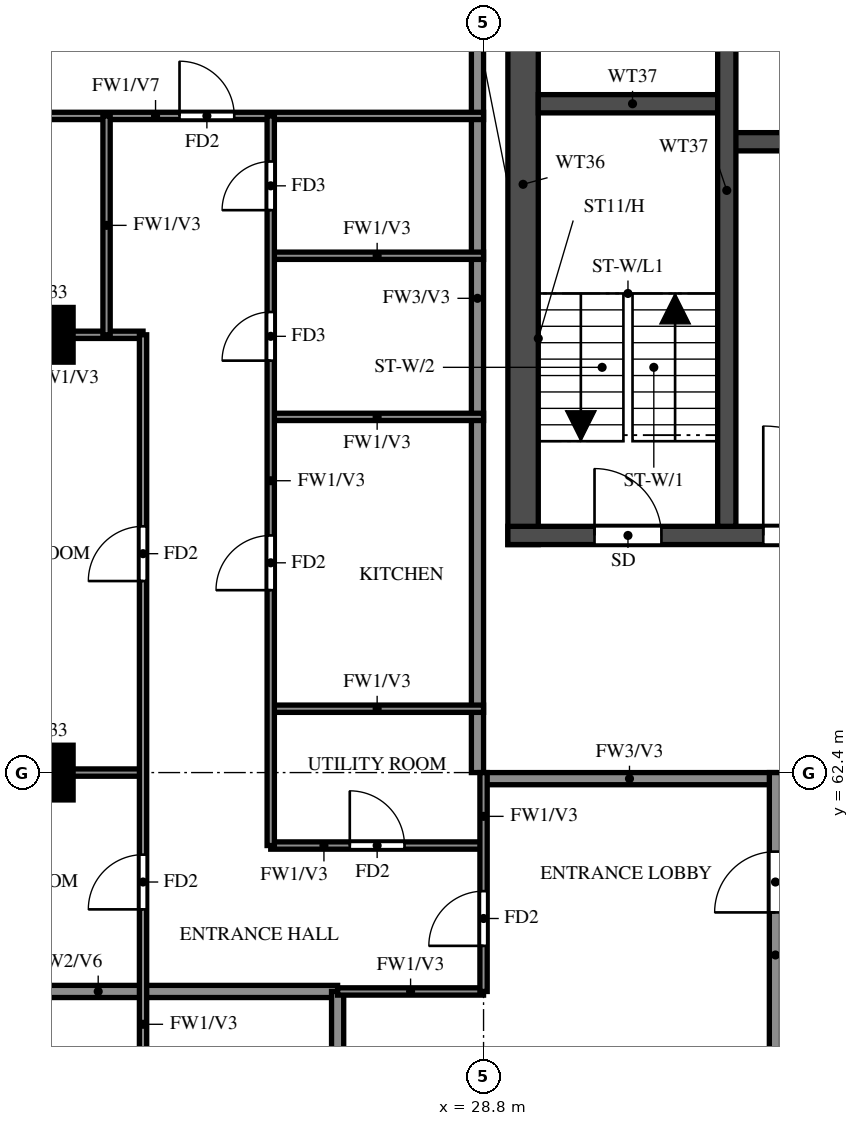
"""IFC4 building model, lengths in metres.
Left out: names, types, materials, properties, quantities, classifications, styles, units other than length and angle.
Written with IfcOpenShell. Run it as: python <this file> out.ifc"""

import sys

from ifc_helpers import new_model, si_unit, direction, frame, frame_2d, origin, origin_2d, place, context, subcontext, project, spatial, rectangle, extrude, source, transform, mapped, element, fill, save


model = new_model("IFC4")
c1 = context("Model", 3, precision=1e-05, world=origin(), true_north=direction((0.0, 1.0)))
c2 = subcontext(c1, "Body", "Model", "MODEL_VIEW")
j1 = project(units=[si_unit("LENGTHUNIT", "METRE"), si_unit("PLANEANGLEUNIT", "RADIAN")], contexts=[c1])
p1 = place(None, origin())
s1 = spatial("IfcSite", under=j1, at=p1, CompositionType="ELEMENT")
p2 = place(p1, origin())
s2 = spatial("IfcBuilding", under=s1, at=p2, CompositionType="ELEMENT")
p3 = place(p2, frame((0.0, 0.0, 218.5)))
s3 = spatial("IfcBuildingStorey", under=s2, at=p3, CompositionType="ELEMENT", Elevation=218.5)
m1 = source(origin(), c2, "Body", "SweptSolid", [
    extrude(rectangle(XDim=0.9, YDim=0.9, at=origin_2d()), origin(), (0.0, 0.0, 1.0), 3.22),
])
for number, where, z_axis, x_axis in (
    (1, (21.6, 62.4, 0.0), (0.0, 0.0, 1.0), (1.0, 0.0, 0.0)),
    (2, (21.6, 69.6, 0.0), (0.0, 0.0, 1.0), (1.0, 0.0, 0.0)),
):
    element("IfcColumn", number, at=place(p3, frame(where, z_axis=z_axis, x_axis=x_axis)), inside=s3, PredefinedType="COLUMN", context=c2, shape_type="MappedRepresentation", body=[
        mapped(m1, transform((0.0, 0.0, 0.0))),
    ])
p4 = place(p3, frame((29.45, 66.15, 0.0), z_axis=(0.0, 0.0, 1.0), x_axis=(0.0, 1.0, 0.0)))
e3 = element("IfcWall", 3, at=p4, inside=s3, PredefinedType="SHEAR", context=c2, shape_type="SweptSolid", body=[
    extrude(rectangle(XDim=11.85, YDim=0.5, at=frame_2d((5.925, 0.0))), origin(), (0.0, 0.0, 1.0), 3.22),
])
p5 = place(p3, frame((29.2, 66.3, 0.0), z_axis=(0.0, 0.0, 1.0), x_axis=(1.0, 0.0, 0.0)))
e4 = element("IfcWall", 4, at=p5, inside=s3, PredefinedType="SHEAR", context=c2, shape_type="SweptSolid", body=[
    extrude(rectangle(XDim=42.4, YDim=0.3, at=frame_2d((21.2, 0.0))), origin(), (0.0, 0.0, 1.0), 3.22),
])
p6 = place(p5, frame((1.425, 0.0, 0.0)))
e5 = element("IfcOpeningElement", 5, at=p6, cuts=e4, PredefinedType="OPENING", context=c2, shape_type="SweptSolid", body=[
    extrude(rectangle(XDim=1.1, YDim=2.1, at=frame_2d((0.55, 1.05))), frame((0.0, 0.16, 0.0), z_axis=(0.0, -1.0, 0.0), x_axis=(1.0, 0.0, 0.0)), (0.0, 0.0, 1.0), 0.32),
])
p7 = place(p5, frame((4.2, 0.0, 0.0)))
e6 = element("IfcOpeningElement", 6, at=p7, cuts=e4, PredefinedType="OPENING", context=c2, shape_type="SweptSolid", body=[
    extrude(rectangle(XDim=1.8, YDim=2.1, at=frame_2d((0.9, 1.05))), frame((0.0, 0.16, 0.0), z_axis=(0.0, -1.0, 0.0), x_axis=(1.0, 0.0, 0.0)), (0.0, 0.0, 1.0), 0.32),
])
p8 = place(p3, frame((32.8, 72.775, 0.0), z_axis=(0.0, 0.0, 1.0), x_axis=(1.0, 0.0, 0.0)))
e7 = element("IfcWall", 7, at=p8, inside=s3, PredefinedType="SHEAR", context=c2, shape_type="SweptSolid", body=[
    extrude(rectangle(XDim=35.2, YDim=0.3, at=frame_2d((17.6, 0.0))), origin(), (0.0, 0.0, 1.0), 3.22),
])
p9 = place(p8, frame((19.8, 0.0, 0.0)))
e8 = element("IfcOpeningElement", 8, at=p9, cuts=e7, PredefinedType="OPENING", context=c2, shape_type="SweptSolid", body=[
    extrude(rectangle(XDim=1.1, YDim=2.1, at=frame_2d((0.55, 1.05))), frame((0.0, 0.16, 0.0), z_axis=(0.0, -1.0, 0.0), x_axis=(1.0, 0.0, 0.0)), (0.0, 0.0, 1.0), 0.32),
])
p10 = place(p8, frame((27.725, 0.0, 0.0)))
e9 = element("IfcOpeningElement", 9, at=p10, cuts=e7, PredefinedType="OPENING", context=c2, shape_type="SweptSolid", body=[
    extrude(rectangle(XDim=1.1, YDim=2.1, at=frame_2d((0.55, 1.05))), frame((0.0, 0.16, 0.0), z_axis=(0.0, -1.0, 0.0), x_axis=(1.0, 0.0, 0.0)), (0.0, 0.0, 1.0), 0.32),
])
p11 = place(p8, frame((30.325, 0.0, 0.0)))
e10 = element("IfcOpeningElement", 10, at=p11, cuts=e7, PredefinedType="OPENING", context=c2, shape_type="SweptSolid", body=[
    extrude(rectangle(XDim=1.1, YDim=2.1, at=frame_2d((0.55, 1.05))), frame((0.0, 0.16, 0.0), z_axis=(0.0, -1.0, 0.0), x_axis=(1.0, 0.0, 0.0)), (0.0, 0.0, 1.0), 0.32),
])
p12 = place(p8, frame((3.825, 0.0, 0.0)))
e11 = element("IfcOpeningElement", 11, at=p12, cuts=e7, PredefinedType="OPENING", context=c2, shape_type="SweptSolid", body=[
    extrude(rectangle(XDim=1.1, YDim=2.1, at=frame_2d((0.55, 1.05))), frame((0.0, 0.16, 0.0), z_axis=(0.0, -1.0, 0.0), x_axis=(1.0, 0.0, 0.0)), (0.0, 0.0, 1.0), 0.32),
])
p13 = place(p8, frame((6.575, 0.0, 0.0)))
e12 = element("IfcOpeningElement", 12, at=p13, cuts=e7, PredefinedType="OPENING", context=c2, shape_type="SweptSolid", body=[
    extrude(rectangle(XDim=1.1, YDim=2.1, at=frame_2d((0.55, 1.05))), frame((0.0, 0.16, 0.0), z_axis=(0.0, -1.0, 0.0), x_axis=(1.0, 0.0, 0.0)), (0.0, 0.0, 1.0), 0.32),
])
p14 = place(p8, frame((9.325, 0.0, 0.0)))
e13 = element("IfcOpeningElement", 13, at=p14, cuts=e7, PredefinedType="OPENING", context=c2, shape_type="SweptSolid", body=[
    extrude(rectangle(XDim=1.1, YDim=2.1, at=frame_2d((0.55, 1.05))), frame((0.0, 0.16, 0.0), z_axis=(0.0, -1.0, 0.0), x_axis=(1.0, 0.0, 0.0)), (0.0, 0.0, 1.0), 0.32),
])
p15 = place(p8, frame((12.075, 0.0, 0.0)))
e14 = element("IfcOpeningElement", 14, at=p15, cuts=e7, PredefinedType="OPENING", context=c2, shape_type="SweptSolid", body=[
    extrude(rectangle(XDim=1.1, YDim=2.1, at=frame_2d((0.55, 1.05))), frame((0.0, 0.16, 0.0), z_axis=(0.0, -1.0, 0.0), x_axis=(1.0, 0.0, 0.0)), (0.0, 0.0, 1.0), 0.32),
])
p16 = place(p8, frame((14.825, 0.0, 0.0)))
e15 = element("IfcOpeningElement", 15, at=p16, cuts=e7, PredefinedType="OPENING", context=c2, shape_type="SweptSolid", body=[
    extrude(rectangle(XDim=1.1, YDim=2.1, at=frame_2d((0.55, 1.05))), frame((0.0, 0.16, 0.0), z_axis=(0.0, -1.0, 0.0), x_axis=(1.0, 0.0, 0.0)), (0.0, 0.0, 1.0), 0.32),
])
p17 = place(p8, frame((17.575, 0.0, 0.0)))
e16 = element("IfcOpeningElement", 16, at=p17, cuts=e7, PredefinedType="OPENING", context=c2, shape_type="SweptSolid", body=[
    extrude(rectangle(XDim=1.1, YDim=2.1, at=frame_2d((0.55, 1.05))), frame((0.0, 0.16, 0.0), z_axis=(0.0, -1.0, 0.0), x_axis=(1.0, 0.0, 0.0)), (0.0, 0.0, 1.0), 0.32),
])
p18 = place(p8, frame((0.95, 0.0, 0.0)))
e17 = element("IfcOpeningElement", 17, at=p18, cuts=e7, PredefinedType="OPENING", context=c2, shape_type="SweptSolid", body=[
    extrude(rectangle(XDim=1.1, YDim=2.1, at=frame_2d((0.55, 1.05))), frame((0.0, 0.16, 0.0), z_axis=(0.0, -1.0, 0.0), x_axis=(1.0, 0.0, 0.0)), (0.0, 0.0, 1.0), 0.32),
])
p19 = place(p3, frame((29.7, 73.4, 0.0), z_axis=(0.0, 0.0, 1.0), x_axis=(1.0, 0.0, 0.0)))
e18 = element("IfcWall", 18, at=p19, inside=s3, PredefinedType="SHEAR", context=c2, shape_type="SweptSolid", body=[
    extrude(rectangle(XDim=3.1, YDim=0.3, at=frame_2d((1.55, 0.0))), origin(), (0.0, 0.0, 1.0), 3.22),
])
p20 = place(p3, frame((32.8, 66.45, 0.0), z_axis=(0.0, 0.0, 1.0), x_axis=(0.0, 1.0, 0.0)))
e19 = element("IfcWall", 19, at=p20, inside=s3, PredefinedType="SHEAR", context=c2, shape_type="SweptSolid", body=[
    extrude(rectangle(XDim=11.05, YDim=0.3, at=frame_2d((5.525, 0.0))), origin(), (0.0, 0.0, 1.0), 3.22),
])
p21 = place(p3, frame((28.8, 62.3, 0.0), z_axis=(0.0, 0.0, 1.0), x_axis=(1.0, 0.0, 0.0)))
e20 = element("IfcWall", 20, at=p21, inside=s3, PredefinedType="SOLIDWALL", context=c2, shape_type="SweptSolid", body=[
    extrude(rectangle(XDim=4.8, YDim=0.2, at=frame_2d((2.4, 0.0))), origin(), (0.0, 0.0, 1.0), 3.22),
])
p22 = place(p3, frame((28.7, 62.4, 0.0), z_axis=(0.0, 0.0, 1.0), x_axis=(0.0, 1.0, 0.0)))
e21 = element("IfcWall", 21, at=p22, inside=s3, PredefinedType="SOLIDWALL", context=c2, shape_type="SweptSolid", body=[
    extrude(rectangle(XDim=15.6, YDim=0.2, at=frame_2d((7.8, 0.0))), origin(), (0.0, 0.0, 1.0), 3.22),
])
p23 = place(p3, frame((33.6, 56.4, 0.0), z_axis=(0.0, 0.0, 1.0), x_axis=(0.0, 1.0, 0.0)))
e22 = element("IfcWall", 22, at=p23, inside=s3, PredefinedType="SOLIDWALL", context=c2, shape_type="SweptSolid", body=[
    extrude(rectangle(XDim=6.0, YDim=0.2, at=frame_2d((3.0, 0.0))), origin(), (0.0, 0.0, 1.0), 3.22),
])
p24 = place(p23, frame((3.7, 0.0, 0.0)))
e23 = element("IfcOpeningElement", 23, at=p24, cuts=e22, PredefinedType="OPENING", context=c2, shape_type="SweptSolid", body=[
    extrude(rectangle(XDim=1.0, YDim=2.1, at=frame_2d((0.5, 1.05))), frame((0.0, 0.11, 0.0), z_axis=(0.0, -1.0, 0.0), x_axis=(1.0, 0.0, 0.0)), (0.0, 0.0, 1.0), 0.22),
])
p25 = place(p3, frame((18.525, 58.8, 0.0), z_axis=(0.0, 0.0, 1.0), x_axis=(1.0, 0.0, 0.0)))
e24 = element("IfcWall", 24, at=p25, inside=s3, PredefinedType="SOLIDWALL", context=c2, shape_type="SweptSolid", body=[
    extrude(rectangle(XDim=7.875, YDim=0.2, at=frame_2d((3.938, 0.0))), origin(), (0.0, 0.0, 1.0), 2.32),
])
p26 = place(p3, frame((26.4, 56.4, 0.0), z_axis=(0.0, 0.0, 1.0), x_axis=(0.0, 1.0, 0.0)))
e25 = element("IfcWall", 25, at=p26, inside=s3, PredefinedType="SOLIDWALL", context=c2, shape_type="SweptSolid", body=[
    extrude(rectangle(XDim=2.4, YDim=0.2, at=frame_2d((1.2, 0.0))), origin(), (0.0, 0.0, 1.0), 3.22),
])
p27 = place(p3, frame((26.4, 58.8, 0.0), z_axis=(0.0, 0.0, 1.0), x_axis=(1.0, 0.0, 0.0)))
e26 = element("IfcWall", 26, at=p27, inside=s3, PredefinedType="PARTITIONING", context=c2, shape_type="SweptSolid", body=[
    extrude(rectangle(XDim=2.4, YDim=0.12, at=frame_2d((1.2, 0.0))), origin(), (0.0, 0.0, 1.0), 3.22),
])
p28 = place(p3, frame((25.3, 61.2, 0.0), z_axis=(0.0, 0.0, 1.0), x_axis=(1.0, 0.0, 0.0)))
e27 = element("IfcWall", 27, at=p28, inside=s3, PredefinedType="PARTITIONING", context=c2, shape_type="SweptSolid", body=[
    extrude(rectangle(XDim=3.5, YDim=0.12, at=frame_2d((1.75, 0.0))), origin(), (0.0, 0.0, 1.0), 3.22),
])
p29 = place(p28, frame((1.3, 0.0, 0.0)))
e28 = element("IfcOpeningElement", 28, at=p29, cuts=e27, PredefinedType="OPENING", context=c2, shape_type="SweptSolid", body=[
    extrude(rectangle(XDim=0.9, YDim=2.1, at=frame_2d((0.45, 1.05))), frame((0.0, 0.07, 0.0), z_axis=(0.0, -1.0, 0.0), x_axis=(1.0, 0.0, 0.0)), (0.0, 0.0, 1.0), 0.14),
])
p30 = place(p3, frame((18.525, 62.4, 0.0), z_axis=(0.0, 0.0, 1.0), x_axis=(1.0, 0.0, 0.0)))
e29 = element("IfcWall", 29, at=p30, inside=s3, PredefinedType="PARTITIONING", context=c2, shape_type="SweptSolid", body=[
    extrude(rectangle(XDim=4.675, YDim=0.12, at=frame_2d((2.337, 0.0))), origin(), (0.0, 0.0, 1.0), 3.22),
])
for number, where, z_axis, x_axis in (
    (30, (25.3, 63.45, 0.0), (0.0, 0.0, 1.0), (1.0, 0.0, 0.0)),
    (31, (25.3, 68.25, 0.0), (0.0, 0.0, 1.0), (1.0, 0.0, 0.0)),
):
    element("IfcWall", number, at=place(p3, frame(where, z_axis=z_axis, x_axis=x_axis)), inside=s3, PredefinedType="PARTITIONING", context=c2, shape_type="SweptSolid", body=[
        extrude(rectangle(XDim=3.5, YDim=0.12, at=frame_2d((1.75, 0.0))), origin(), (0.0, 0.0, 1.0), 3.22),
    ])
p31 = place(p3, frame((18.525, 69.6, 0.0), z_axis=(0.0, 0.0, 1.0), x_axis=(1.0, 0.0, 0.0)))
e32 = element("IfcWall", 32, at=p31, inside=s3, PredefinedType="PARTITIONING", context=c2, shape_type="SweptSolid", body=[
    extrude(rectangle(XDim=4.675, YDim=0.12, at=frame_2d((2.337, 0.0))), origin(), (0.0, 0.0, 1.0), 3.22),
])
p32 = place(p31, frame((1.538, 0.0, 0.0)))
e33 = element("IfcOpeningElement", 33, at=p32, cuts=e32, PredefinedType="OPENING", context=c2, shape_type="SweptSolid", body=[
    extrude(rectangle(XDim=0.8, YDim=2.1, at=frame_2d((0.4, 1.05))), frame((0.0, 0.07, 0.0), z_axis=(0.0, -1.0, 0.0), x_axis=(1.0, 0.0, 0.0)), (0.0, 0.0, 1.0), 0.14),
])
p33 = place(p3, frame((25.3, 70.9, 0.0), z_axis=(0.0, 0.0, 1.0), x_axis=(1.0, 0.0, 0.0)))
e34 = element("IfcWall", 34, at=p33, inside=s3, PredefinedType="PARTITIONING", context=c2, shape_type="SweptSolid", body=[
    extrude(rectangle(XDim=3.5, YDim=0.12, at=frame_2d((1.75, 0.0))), origin(), (0.0, 0.0, 1.0), 3.22),
])
p34 = place(p3, frame((18.525, 73.2, 0.0), z_axis=(0.0, 0.0, 1.0), x_axis=(1.0, 0.0, 0.0)))
e35 = element("IfcWall", 35, at=p34, inside=s3, PredefinedType="PARTITIONING", context=c2, shape_type="SweptSolid", body=[
    extrude(rectangle(XDim=10.275, YDim=0.12, at=frame_2d((5.138, 0.0))), origin(), (0.0, 0.0, 1.0), 2.32),
])
p35 = place(p34, frame((5.275, 0.0, 0.0)))
e36 = element("IfcOpeningElement", 36, at=p35, cuts=e35, PredefinedType="OPENING", context=c2, shape_type="SweptSolid", body=[
    extrude(rectangle(XDim=0.9, YDim=2.1, at=frame_2d((0.45, 1.05))), frame((0.0, 0.07, 0.0), z_axis=(0.0, -1.0, 0.0), x_axis=(1.0, 0.0, 0.0)), (0.0, 0.0, 1.0), 0.14),
])
p36 = place(p3, frame((22.6, 69.6, 0.0), z_axis=(0.0, 0.0, 1.0), x_axis=(0.0, 1.0, 0.0)))
e37 = element("IfcWall", 37, at=p36, inside=s3, PredefinedType="PARTITIONING", context=c2, shape_type="SweptSolid", body=[
    extrude(rectangle(XDim=3.6, YDim=0.12, at=frame_2d((1.8, 0.0))), origin(), (0.0, 0.0, 1.0), 3.22),
])
p37 = place(p3, frame((23.2, 48.0, 0.0), z_axis=(0.0, 0.0, 1.0), x_axis=(0.0, 1.0, 0.0)))
e38 = element("IfcWall", 38, at=p37, inside=s3, PredefinedType="PARTITIONING", context=c2, shape_type="SweptSolid", body=[
    extrude(rectangle(XDim=21.6, YDim=0.12, at=frame_2d((10.8, 0.0))), origin(), (0.0, 0.0, 1.0), 3.22),
])
p38 = place(p37, frame((1.35, 0.0, 0.0)))
e39 = element("IfcOpeningElement", 39, at=p38, cuts=e38, PredefinedType="OPENING", context=c2, shape_type="SweptSolid", body=[
    extrude(rectangle(XDim=0.9, YDim=2.1, at=frame_2d((0.45, 1.05))), frame((0.0, 0.07, 0.0), z_axis=(0.0, -1.0, 0.0), x_axis=(1.0, 0.0, 0.0)), (0.0, 0.0, 1.0), 0.14),
])
p39 = place(p37, frame((4.95, 0.0, 0.0)))
e40 = element("IfcOpeningElement", 40, at=p39, cuts=e38, PredefinedType="OPENING", context=c2, shape_type="SweptSolid", body=[
    extrude(rectangle(XDim=0.9, YDim=2.1, at=frame_2d((0.45, 1.05))), frame((0.0, 0.07, 0.0), z_axis=(0.0, -1.0, 0.0), x_axis=(1.0, 0.0, 0.0)), (0.0, 0.0, 1.0), 0.14),
])
p40 = place(p37, frame((8.25, 0.0, 0.0)))
e41 = element("IfcOpeningElement", 41, at=p40, cuts=e38, PredefinedType="OPENING", context=c2, shape_type="SweptSolid", body=[
    extrude(rectangle(XDim=1.5, YDim=2.1, at=frame_2d((0.75, 1.05))), frame((0.0, 0.07, 0.0), z_axis=(0.0, -1.0, 0.0), x_axis=(1.0, 0.0, 0.0)), (0.0, 0.0, 1.0), 0.14),
])
p41 = place(p37, frame((12.15, 0.0, 0.0)))
e42 = element("IfcOpeningElement", 42, at=p41, cuts=e38, PredefinedType="OPENING", context=c2, shape_type="SweptSolid", body=[
    extrude(rectangle(XDim=0.9, YDim=2.1, at=frame_2d((0.45, 1.05))), frame((0.0, 0.07, 0.0), z_axis=(0.0, -1.0, 0.0), x_axis=(1.0, 0.0, 0.0)), (0.0, 0.0, 1.0), 0.14),
])
p42 = place(p37, frame((17.55, 0.0, 0.0)))
e43 = element("IfcOpeningElement", 43, at=p42, cuts=e38, PredefinedType="OPENING", context=c2, shape_type="SweptSolid", body=[
    extrude(rectangle(XDim=0.9, YDim=2.1, at=frame_2d((0.45, 1.05))), frame((0.0, 0.07, 0.0), z_axis=(0.0, -1.0, 0.0), x_axis=(1.0, 0.0, 0.0)), (0.0, 0.0, 1.0), 0.14),
])
p43 = place(p3, frame((25.3, 61.2, 0.0), z_axis=(0.0, 0.0, 1.0), x_axis=(0.0, 1.0, 0.0)))
e44 = element("IfcWall", 44, at=p43, inside=s3, PredefinedType="PARTITIONING", context=c2, shape_type="SweptSolid", body=[
    extrude(rectangle(XDim=12.0, YDim=0.12, at=frame_2d((6.0, 0.0))), origin(), (0.0, 0.0, 1.0), 3.22),
])
p44 = place(p43, frame((4.2, 0.0, 0.0)))
e45 = element("IfcOpeningElement", 45, at=p44, cuts=e44, PredefinedType="OPENING", context=c2, shape_type="SweptSolid", body=[
    extrude(rectangle(XDim=0.9, YDim=2.1, at=frame_2d((0.45, 1.05))), frame((0.0, 0.07, 0.0), z_axis=(0.0, -1.0, 0.0), x_axis=(1.0, 0.0, 0.0)), (0.0, 0.0, 1.0), 0.14),
])
p45 = place(p43, frame((7.975, 0.0, 0.0)))
e46 = element("IfcOpeningElement", 46, at=p45, cuts=e44, PredefinedType="OPENING", context=c2, shape_type="SweptSolid", body=[
    extrude(rectangle(XDim=0.8, YDim=2.1, at=frame_2d((0.4, 1.05))), frame((0.0, 0.07, 0.0), z_axis=(0.0, -1.0, 0.0), x_axis=(1.0, 0.0, 0.0)), (0.0, 0.0, 1.0), 0.14),
])
p46 = place(p43, frame((10.45, 0.0, 0.0)))
e47 = element("IfcOpeningElement", 47, at=p46, cuts=e44, PredefinedType="OPENING", context=c2, shape_type="SweptSolid", body=[
    extrude(rectangle(XDim=0.8, YDim=2.1, at=frame_2d((0.4, 1.05))), frame((0.0, 0.07, 0.0), z_axis=(0.0, -1.0, 0.0), x_axis=(1.0, 0.0, 0.0)), (0.0, 0.0, 1.0), 0.14),
])
p47 = place(p3, frame((28.8, 58.8, 0.0), z_axis=(0.0, 0.0, 1.0), x_axis=(0.0, 1.0, 0.0)))
e48 = element("IfcWall", 48, at=p47, inside=s3, PredefinedType="PARTITIONING", context=c2, shape_type="SweptSolid", body=[
    extrude(rectangle(XDim=3.6, YDim=0.12, at=frame_2d((1.8, 0.0))), origin(), (0.0, 0.0, 1.0), 3.22),
])
p48 = place(p47, frame((0.75, 0.0, 0.0)))
e49 = element("IfcOpeningElement", 49, at=p48, cuts=e48, PredefinedType="OPENING", context=c2, shape_type="SweptSolid", body=[
    extrude(rectangle(XDim=0.9, YDim=2.1, at=frame_2d((0.45, 1.05))), frame((0.0, 0.07, 0.0), z_axis=(0.0, -1.0, 0.0), x_axis=(1.0, 0.0, 0.0)), (0.0, 0.0, 1.0), 0.14),
])
p49 = place(p6, origin())
e50 = element("IfcDoor", 50, at=p49, inside=s3, OperationType="SINGLE_SWING_LEFT", PredefinedType="DOOR", context=c2, shape_type="SweptSolid", body=[
    extrude(rectangle(XDim=1.1, YDim=2.1, at=frame_2d((0.55, 1.05))), frame((0.0, 0.025, 0.0), z_axis=(0.0, -1.0, 0.0), x_axis=(1.0, 0.0, 0.0)), (0.0, 0.0, 1.0), 0.05),
])
fill(e5, e50)
p50 = place(p7, origin())
e51 = element("IfcDoor", 51, at=p50, inside=s3, OperationType="DOUBLE_DOOR_SINGLE_SWING", PredefinedType="DOOR", context=c2, shape_type="SweptSolid", body=[
    extrude(rectangle(XDim=1.8, YDim=2.1, at=frame_2d((0.9, 1.05))), frame((0.0, 0.025, 0.0), z_axis=(0.0, -1.0, 0.0), x_axis=(1.0, 0.0, 0.0)), (0.0, 0.0, 1.0), 0.05),
])
fill(e6, e51)
p51 = place(p48, origin())
e52 = element("IfcDoor", 52, at=p51, inside=s3, OperationType="SINGLE_SWING_LEFT", PredefinedType="DOOR", context=c2, shape_type="SweptSolid", body=[
    extrude(rectangle(XDim=0.9, YDim=2.1, at=frame_2d((0.45, 1.05))), frame((0.0, 0.025, 0.0), z_axis=(0.0, -1.0, 0.0), x_axis=(1.0, 0.0, 0.0)), (0.0, 0.0, 1.0), 0.05),
])
fill(e49, e52)
p52 = place(p24, origin())
e53 = element("IfcDoor", 53, at=p52, inside=s3, OperationType="SINGLE_SWING_RIGHT", PredefinedType="DOOR", context=c2, shape_type="SweptSolid", body=[
    extrude(rectangle(XDim=1.0, YDim=2.1, at=frame_2d((0.5, 1.05))), frame((0.0, 0.025, 0.0), z_axis=(0.0, -1.0, 0.0), x_axis=(1.0, 0.0, 0.0)), (0.0, 0.0, 1.0), 0.05),
])
fill(e23, e53)
p53 = place(p41, origin())
e54 = element("IfcDoor", 54, at=p53, inside=s3, OperationType="SINGLE_SWING_LEFT", PredefinedType="DOOR", context=c2, shape_type="SweptSolid", body=[
    extrude(rectangle(XDim=0.9, YDim=2.1, at=frame_2d((0.45, 1.05))), frame((0.0, 0.025, 0.0), z_axis=(0.0, -1.0, 0.0), x_axis=(1.0, 0.0, 0.0)), (0.0, 0.0, 1.0), 0.05),
])
fill(e42, e54)
p54 = place(p42, origin())
e55 = element("IfcDoor", 55, at=p54, inside=s3, OperationType="SINGLE_SWING_LEFT", PredefinedType="DOOR", context=c2, shape_type="SweptSolid", body=[
    extrude(rectangle(XDim=0.9, YDim=2.1, at=frame_2d((0.45, 1.05))), frame((0.0, 0.025, 0.0), z_axis=(0.0, -1.0, 0.0), x_axis=(1.0, 0.0, 0.0)), (0.0, 0.0, 1.0), 0.05),
])
fill(e43, e55)
p55 = place(p35, origin())
e56 = element("IfcDoor", 56, at=p55, inside=s3, OperationType="SINGLE_SWING_LEFT", PredefinedType="DOOR", context=c2, shape_type="SweptSolid", body=[
    extrude(rectangle(XDim=0.9, YDim=2.1, at=frame_2d((0.45, 1.05))), frame((0.0, 0.025, 0.0), z_axis=(0.0, -1.0, 0.0), x_axis=(1.0, 0.0, 0.0)), (0.0, 0.0, 1.0), 0.05),
])
fill(e36, e56)
p56 = place(p29, origin())
e57 = element("IfcDoor", 57, at=p56, inside=s3, OperationType="SINGLE_SWING_LEFT", PredefinedType="DOOR", context=c2, shape_type="SweptSolid", body=[
    extrude(rectangle(XDim=0.9, YDim=2.1, at=frame_2d((0.45, 1.05))), frame((0.0, 0.025, 0.0), z_axis=(0.0, -1.0, 0.0), x_axis=(1.0, 0.0, 0.0)), (0.0, 0.0, 1.0), 0.05),
])
fill(e28, e57)
p57 = place(p44, origin())
e58 = element("IfcDoor", 58, at=p57, inside=s3, OperationType="SINGLE_SWING_RIGHT", PredefinedType="DOOR", context=c2, shape_type="SweptSolid", body=[
    extrude(rectangle(XDim=0.9, YDim=2.1, at=frame_2d((0.45, 1.05))), frame((0.0, 0.025, 0.0), z_axis=(0.0, -1.0, 0.0), x_axis=(1.0, 0.0, 0.0)), (0.0, 0.0, 1.0), 0.05),
])
fill(e45, e58)
p58 = place(p45, origin())
e59 = element("IfcDoor", 59, at=p58, inside=s3, OperationType="SINGLE_SWING_LEFT", PredefinedType="DOOR", context=c2, shape_type="SweptSolid", body=[
    extrude(rectangle(XDim=0.8, YDim=2.1, at=frame_2d((0.4, 1.05))), frame((0.0, 0.025, 0.0), z_axis=(0.0, -1.0, 0.0), x_axis=(1.0, 0.0, 0.0)), (0.0, 0.0, 1.0), 0.05),
])
fill(e46, e59)
p59 = place(p46, origin())
e60 = element("IfcDoor", 60, at=p59, inside=s3, OperationType="SINGLE_SWING_LEFT", PredefinedType="DOOR", context=c2, shape_type="SweptSolid", body=[
    extrude(rectangle(XDim=0.8, YDim=2.1, at=frame_2d((0.4, 1.05))), frame((0.0, 0.025, 0.0), z_axis=(0.0, -1.0, 0.0), x_axis=(1.0, 0.0, 0.0)), (0.0, 0.0, 1.0), 0.05),
])
fill(e47, e60)
save(model, sys.argv[1])
